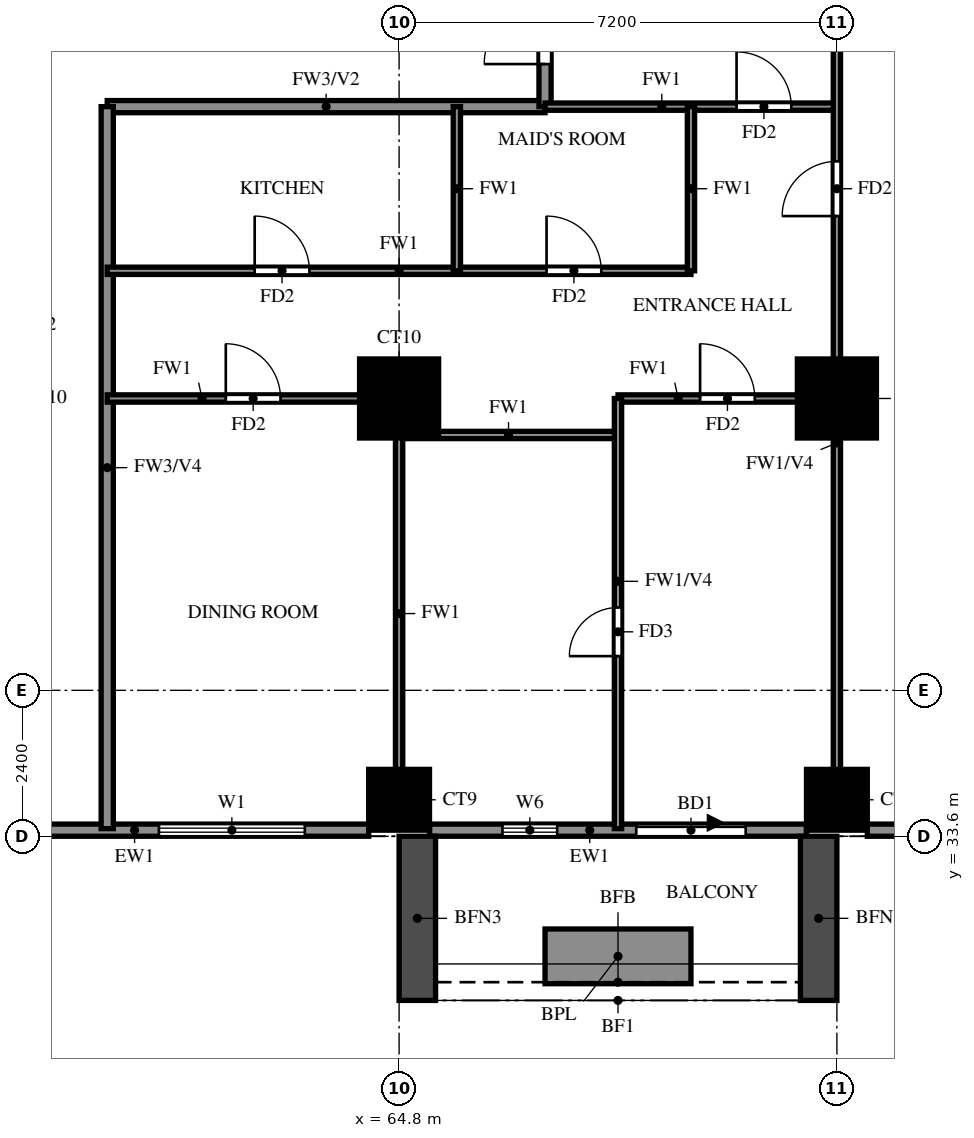
"""IFC4 building model, lengths in metres.
Left out: names, types, materials, properties, quantities, classifications, styles, units other than length and angle.
Written with IfcOpenShell. Run it as: python <this file> out.ifc"""

import sys

from ifc_helpers import new_model, si_unit, direction, frame, frame_2d, origin, origin_2d, place, context, subcontext, project, spatial, rectangle, extrude, source, transform, mapped, element, fill, save


model = new_model("IFC4")
c1 = context("Model", 3, precision=1e-05, world=origin(), true_north=direction((0.0, 1.0)))
c2 = subcontext(c1, "Body", "Model", "MODEL_VIEW")
j1 = project(units=[si_unit("LENGTHUNIT", "METRE"), si_unit("PLANEANGLEUNIT", "RADIAN")], contexts=[c1])
p1 = place(None, origin())
s1 = spatial("IfcSite", under=j1, at=p1, CompositionType="ELEMENT")
p2 = place(p1, origin())
s2 = spatial("IfcBuilding", under=s1, at=p2, CompositionType="ELEMENT")
p3 = place(p2, frame((0.0, 0.0, 72.5)))
s3 = spatial("IfcBuildingStorey", under=s2, at=p3, CompositionType="ELEMENT", Elevation=72.5)
m1 = source(origin(), c2, "Body", "SweptSolid", [
    extrude(rectangle(XDim=1.0, YDim=1.0, at=origin_2d()), origin(), (0.0, 0.0, 1.0), 3.18),
])
for number, where, z_axis, x_axis in (
    (1, (64.8, 34.2, 0.0), (0.0, 0.0, 1.0), (1.0, 0.0, 0.0)),
    (2, (72.0, 34.2, 0.0), (0.0, 0.0, 1.0), (1.0, 0.0, 0.0)),
):
    element("IfcColumn", number, at=place(p3, frame(where, z_axis=z_axis, x_axis=x_axis)), inside=s3, PredefinedType="COLUMN", context=c2, shape_type="MappedRepresentation", body=[
        mapped(m1, transform((0.0, 0.0, 0.0))),
    ])
m2 = source(origin(), c2, "Body", "SweptSolid", [
    extrude(rectangle(XDim=1.3, YDim=1.3, at=origin_2d()), origin(), (0.0, 0.0, 1.0), 3.18),
])
for number, where, z_axis, x_axis in (
    (3, (64.8, 40.8, 0.0), (0.0, 0.0, 1.0), (1.0, 0.0, 0.0)),
    (4, (72.0, 40.8, 0.0), (0.0, 0.0, 1.0), (1.0, 0.0, 0.0)),
):
    element("IfcColumn", number, at=place(p3, frame(where, z_axis=z_axis, x_axis=x_axis)), inside=s3, PredefinedType="COLUMN", context=c2, shape_type="MappedRepresentation", body=[
        mapped(m2, transform((0.0, 0.0, 0.0))),
    ])
p4 = place(p3, frame((85.996, 33.863, 0.0), z_axis=(0.0, 0.0, 1.0), x_axis=(-0.707100718496, 0.707112843825, 0.0)))
e5 = element("IfcWall", 5, at=p4, inside=s3, PredefinedType="SOLIDWALL", context=c2, shape_type="SweptSolid", body=[
    extrude(rectangle(XDim=20.135, YDim=0.2, at=frame_2d((10.067, 0.0))), origin(), (0.0, 0.0, 1.0), 3.18),
])
p5 = place(p3, frame((58.8, 33.7, 0.0), z_axis=(0.0, 0.0, 1.0), x_axis=(1.0, 0.0, 0.0)))
e6 = element("IfcWall", 6, at=p5, inside=s3, PredefinedType="SOLIDWALL", context=c2, shape_type="SweptSolid", body=[
    extrude(rectangle(XDim=5.5, YDim=0.2, at=frame_2d((2.75, 0.0))), origin(), (0.0, 0.0, 1.0), 3.18),
])
p6 = place(p5, frame((2.05, 0.0, 0.6)))
e7 = element("IfcOpeningElement", 7, at=p6, cuts=e6, PredefinedType="OPENING", context=c2, shape_type="SweptSolid", body=[
    extrude(rectangle(XDim=2.4, YDim=2.4, at=frame_2d((1.2, 1.2))), frame((0.0, 0.11, 0.0), z_axis=(0.0, -1.0, 0.0), x_axis=(1.0, 0.0, 0.0)), (0.0, 0.0, 1.0), 0.22),
])
p7 = place(p3, frame((65.3, 33.7, 0.0), z_axis=(0.0, 0.0, 1.0), x_axis=(1.0, 0.0, 0.0)))
e8 = element("IfcWall", 8, at=p7, inside=s3, PredefinedType="SOLIDWALL", context=c2, shape_type="SweptSolid", body=[
    extrude(rectangle(XDim=6.2, YDim=0.2, at=frame_2d((3.1, 0.0))), origin(), (0.0, 0.0, 1.0), 3.18),
])
p8 = place(p7, frame((3.4, 0.0, 0.0)))
e9 = element("IfcOpeningElement", 9, at=p8, cuts=e8, PredefinedType="OPENING", context=c2, shape_type="SweptSolid", body=[
    extrude(rectangle(XDim=1.8, YDim=2.4, at=frame_2d((0.9, 1.2))), frame((0.0, 0.11, 0.0), z_axis=(0.0, -1.0, 0.0), x_axis=(1.0, 0.0, 0.0)), (0.0, 0.0, 1.0), 0.22),
])
p9 = place(p7, frame((1.2, 0.0, 1.5)))
e10 = element("IfcOpeningElement", 10, at=p9, cuts=e8, PredefinedType="OPENING", context=c2, shape_type="SweptSolid", body=[
    extrude(rectangle(XDim=0.9, YDim=0.9, at=frame_2d((0.45, 0.45))), frame((0.0, 0.11, 0.0), z_axis=(0.0, -1.0, 0.0), x_axis=(1.0, 0.0, 0.0)), (0.0, 0.0, 1.0), 0.22),
])
p10 = place(p3, frame((72.5, 33.7, 0.0), z_axis=(0.0, 0.0, 1.0), x_axis=(1.0, 0.0, 0.0)))
e11 = element("IfcWall", 11, at=p10, inside=s3, PredefinedType="SOLIDWALL", context=c2, shape_type="SweptSolid", body=[
    extrude(rectangle(XDim=13.659, YDim=0.2, at=frame_2d((6.829, 0.0))), origin(), (0.0, 0.0, 1.0), 3.18),
])
p11 = place(p10, frame((1.2, 0.0, 0.6)))
e12 = element("IfcOpeningElement", 12, at=p11, cuts=e11, PredefinedType="OPENING", context=c2, shape_type="SweptSolid", body=[
    extrude(rectangle(XDim=2.4, YDim=2.4, at=frame_2d((1.2, 1.2))), frame((0.0, 0.11, 0.0), z_axis=(0.0, -1.0, 0.0), x_axis=(1.0, 0.0, 0.0)), (0.0, 0.0, 1.0), 0.22),
])
p12 = place(p10, frame((4.5, 0.0, 0.6)))
e13 = element("IfcOpeningElement", 13, at=p12, cuts=e11, PredefinedType="OPENING", context=c2, shape_type="SweptSolid", body=[
    extrude(rectangle(XDim=2.4, YDim=2.4, at=frame_2d((1.2, 1.2))), frame((0.0, 0.11, 0.0), z_axis=(0.0, -1.0, 0.0), x_axis=(1.0, 0.0, 0.0)), (0.0, 0.0, 1.0), 0.22),
])
p13 = place(p10, frame((9.479, 0.0, 0.6)))
e14 = element("IfcOpeningElement", 14, at=p13, cuts=e11, PredefinedType="OPENING", context=c2, shape_type="SweptSolid", body=[
    extrude(rectangle(XDim=2.4, YDim=2.4, at=frame_2d((1.2, 1.2))), frame((0.0, 0.11, 0.0), z_axis=(0.0, -1.0, 0.0), x_axis=(1.0, 0.0, 0.0)), (0.0, 0.0, 1.0), 0.22),
])
for number, where, z_axis, x_axis in (
    (15, (65.1, 33.6, 0.0), (0.0, 0.0, 1.0), (0.0, -1.0, 0.0)),
    (16, (71.7, 33.6, 0.0), (0.0, 0.0, 1.0), (0.0, -1.0, 0.0)),
):
    element("IfcWall", number, at=place(p3, frame(where, z_axis=z_axis, x_axis=x_axis)), inside=s3, PredefinedType="SOLIDWALL", context=c2, shape_type="SweptSolid", body=[
        extrude(rectangle(XDim=2.7, YDim=0.6, at=frame_2d((1.35, 0.0))), origin(), (0.0, 0.0, 1.0), 2.85),
    ])
p14 = place(p3, frame((67.2, 31.625, 0.0), z_axis=(0.0, 0.0, 1.0), x_axis=(1.0, 0.0, 0.0)))
e17 = element("IfcWall", 17, at=p14, inside=s3, PredefinedType="SOLIDWALL", context=c2, shape_type="SweptSolid", body=[
    extrude(rectangle(XDim=2.4, YDim=0.9, at=frame_2d((1.2, 0.0))), origin(), (0.0, 0.0, 1.0), 0.9),
])
p15 = place(p3, frame((60.0, 45.6, 0.0), z_axis=(0.0, 0.0, 1.0), x_axis=(1.0, 0.0, 0.0)))
e18 = element("IfcWall", 18, at=p15, inside=s3, PredefinedType="SOLIDWALL", context=c2, shape_type="SweptSolid", body=[
    extrude(rectangle(XDim=7.2, YDim=0.2, at=frame_2d((3.6, 0.0))), origin(), (0.0, 0.0, 1.0), 3.18),
])
p16 = place(p3, frame((60.0, 33.725, 0.0), z_axis=(0.0, 0.0, 1.0), x_axis=(0.0, 1.0, 0.0)))
e19 = element("IfcWall", 19, at=p16, inside=s3, PredefinedType="SOLIDWALL", context=c2, shape_type="SweptSolid", body=[
    extrude(rectangle(XDim=11.875, YDim=0.2, at=frame_2d((5.938, 0.0))), origin(), (0.0, 0.0, 1.0), 2.28),
])
p17 = place(p3, frame((67.2, 45.6, 0.0), z_axis=(0.0, 0.0, 1.0), x_axis=(0.0, 1.0, 0.0)))
e20 = element("IfcWall", 20, at=p17, inside=s3, PredefinedType="SOLIDWALL", context=c2, shape_type="SweptSolid", body=[
    extrude(rectangle(XDim=14.4, YDim=0.2, at=frame_2d((7.2, 0.0))), origin(), (0.0, 0.0, 1.0), 3.18),
])
p18 = place(p17, frame((0.7, 0.0, 0.0)))
e21 = element("IfcOpeningElement", 21, at=p18, cuts=e20, PredefinedType="OPENING", context=c2, shape_type="SweptSolid", body=[
    extrude(rectangle(XDim=1.0, YDim=2.1, at=frame_2d((0.5, 1.05))), frame((0.0, 0.11, 0.0), z_axis=(0.0, -1.0, 0.0), x_axis=(1.0, 0.0, 0.0)), (0.0, 0.0, 1.0), 0.22),
])
p19 = place(p3, frame((64.8, 40.2, 0.0), z_axis=(0.0, 0.0, 1.0), x_axis=(1.0, 0.0, 0.0)))
e22 = element("IfcWall", 22, at=p19, inside=s3, PredefinedType="PARTITIONING", context=c2, shape_type="SweptSolid", body=[
    extrude(rectangle(XDim=3.6, YDim=0.12, at=frame_2d((1.8, 0.0))), origin(), (0.0, 0.0, 1.0), 3.18),
])
p20 = place(p3, frame((60.0, 40.8, 0.0), z_axis=(0.0, 0.0, 1.0), x_axis=(1.0, 0.0, 0.0)))
e23 = element("IfcWall", 23, at=p20, inside=s3, PredefinedType="PARTITIONING", context=c2, shape_type="SweptSolid", body=[
    extrude(rectangle(XDim=4.8, YDim=0.12, at=frame_2d((2.4, 0.0))), origin(), (0.0, 0.0, 1.0), 3.18),
])
p21 = place(p20, frame((1.95, 0.0, 0.0)))
e24 = element("IfcOpeningElement", 24, at=p21, cuts=e23, PredefinedType="OPENING", context=c2, shape_type="SweptSolid", body=[
    extrude(rectangle(XDim=0.9, YDim=2.1, at=frame_2d((0.45, 1.05))), frame((0.0, 0.07, 0.0), z_axis=(0.0, -1.0, 0.0), x_axis=(1.0, 0.0, 0.0)), (0.0, 0.0, 1.0), 0.14),
])
p22 = place(p3, frame((68.4, 40.8, 0.0), z_axis=(0.0, 0.0, 1.0), x_axis=(1.0, 0.0, 0.0)))
e25 = element("IfcWall", 25, at=p22, inside=s3, PredefinedType="PARTITIONING", context=c2, shape_type="SweptSolid", body=[
    extrude(rectangle(XDim=3.6, YDim=0.12, at=frame_2d((1.8, 0.0))), origin(), (0.0, 0.0, 1.0), 3.18),
])
p23 = place(p22, frame((1.35, 0.0, 0.0)))
e26 = element("IfcOpeningElement", 26, at=p23, cuts=e25, PredefinedType="OPENING", context=c2, shape_type="SweptSolid", body=[
    extrude(rectangle(XDim=0.9, YDim=2.1, at=frame_2d((0.45, 1.05))), frame((0.0, 0.07, 0.0), z_axis=(0.0, -1.0, 0.0), x_axis=(1.0, 0.0, 0.0)), (0.0, 0.0, 1.0), 0.14),
])
p24 = place(p3, frame((60.0, 42.9, 0.0), z_axis=(0.0, 0.0, 1.0), x_axis=(1.0, 0.0, 0.0)))
e27 = element("IfcWall", 27, at=p24, inside=s3, PredefinedType="PARTITIONING", context=c2, shape_type="SweptSolid", body=[
    extrude(rectangle(XDim=9.6, YDim=0.12, at=frame_2d((4.8, 0.0))), origin(), (0.0, 0.0, 1.0), 3.18),
])
p25 = place(p24, frame((7.225, 0.0, 0.0)))
e28 = element("IfcOpeningElement", 28, at=p25, cuts=e27, PredefinedType="OPENING", context=c2, shape_type="SweptSolid", body=[
    extrude(rectangle(XDim=0.9, YDim=2.1, at=frame_2d((0.45, 1.05))), frame((0.0, 0.07, 0.0), z_axis=(0.0, -1.0, 0.0), x_axis=(1.0, 0.0, 0.0)), (0.0, 0.0, 1.0), 0.14),
])
p26 = place(p24, frame((2.425, 0.0, 0.0)))
e29 = element("IfcOpeningElement", 29, at=p26, cuts=e27, PredefinedType="OPENING", context=c2, shape_type="SweptSolid", body=[
    extrude(rectangle(XDim=0.9, YDim=2.1, at=frame_2d((0.45, 1.05))), frame((0.0, 0.07, 0.0), z_axis=(0.0, -1.0, 0.0), x_axis=(1.0, 0.0, 0.0)), (0.0, 0.0, 1.0), 0.14),
])
p27 = place(p3, frame((67.2, 45.6, 0.0), z_axis=(0.0, 0.0, 1.0), x_axis=(1.0, 0.0, 0.0)))
e30 = element("IfcWall", 30, at=p27, inside=s3, PredefinedType="PARTITIONING", context=c2, shape_type="SweptSolid", body=[
    extrude(rectangle(XDim=4.8, YDim=0.12, at=frame_2d((2.4, 0.0))), origin(), (0.0, 0.0, 1.0), 3.18),
])
p28 = place(p27, frame((3.15, 0.0, 0.0)))
e31 = element("IfcOpeningElement", 31, at=p28, cuts=e30, PredefinedType="OPENING", context=c2, shape_type="SweptSolid", body=[
    extrude(rectangle(XDim=0.9, YDim=2.1, at=frame_2d((0.45, 1.05))), frame((0.0, 0.07, 0.0), z_axis=(0.0, -1.0, 0.0), x_axis=(1.0, 0.0, 0.0)), (0.0, 0.0, 1.0), 0.14),
])
p29 = place(p3, frame((64.8, 33.725, 0.0), z_axis=(0.0, 0.0, 1.0), x_axis=(0.0, 1.0, 0.0)))
e32 = element("IfcWall", 32, at=p29, inside=s3, PredefinedType="PARTITIONING", context=c2, shape_type="SweptSolid", body=[
    extrude(rectangle(XDim=7.075, YDim=0.12, at=frame_2d((3.538, 0.0))), origin(), (0.0, 0.0, 1.0), 3.18),
])
p30 = place(p3, frame((65.75, 42.9, 0.0), z_axis=(0.0, 0.0, 1.0), x_axis=(0.0, 1.0, 0.0)))
e33 = element("IfcWall", 33, at=p30, inside=s3, PredefinedType="PARTITIONING", context=c2, shape_type="SweptSolid", body=[
    extrude(rectangle(XDim=2.7, YDim=0.12, at=frame_2d((1.35, 0.0))), origin(), (0.0, 0.0, 1.0), 3.18),
])
p31 = place(p3, frame((68.4, 33.725, 0.0), z_axis=(0.0, 0.0, 1.0), x_axis=(0.0, 1.0, 0.0)))
e34 = element("IfcWall", 34, at=p31, inside=s3, PredefinedType="PARTITIONING", context=c2, shape_type="SweptSolid", body=[
    extrude(rectangle(XDim=7.075, YDim=0.12, at=frame_2d((3.538, 0.0))), origin(), (0.0, 0.0, 1.0), 2.28),
])
p32 = place(p31, frame((2.837, 0.0, 0.0)))
e35 = element("IfcOpeningElement", 35, at=p32, cuts=e34, PredefinedType="OPENING", context=c2, shape_type="SweptSolid", body=[
    extrude(rectangle(XDim=0.8, YDim=2.1, at=frame_2d((0.4, 1.05))), frame((0.0, 0.07, 0.0), z_axis=(0.0, -1.0, 0.0), x_axis=(1.0, 0.0, 0.0)), (0.0, 0.0, 1.0), 0.14),
])
p33 = place(p3, frame((69.6, 42.9, 0.0), z_axis=(0.0, 0.0, 1.0), x_axis=(0.0, 1.0, 0.0)))
e36 = element("IfcWall", 36, at=p33, inside=s3, PredefinedType="PARTITIONING", context=c2, shape_type="SweptSolid", body=[
    extrude(rectangle(XDim=2.7, YDim=0.12, at=frame_2d((1.35, 0.0))), origin(), (0.0, 0.0, 1.0), 3.18),
])
p34 = place(p3, frame((72.0, 33.725, 0.0), z_axis=(0.0, 0.0, 1.0), x_axis=(0.0, 1.0, 0.0)))
e37 = element("IfcWall", 37, at=p34, inside=s3, PredefinedType="PARTITIONING", context=c2, shape_type="SweptSolid", body=[
    extrude(rectangle(XDim=14.098, YDim=0.12, at=frame_2d((7.049, 0.0))), origin(), (0.0, 0.0, 1.0), 2.28),
])
p35 = place(p34, frame((10.075, 0.0, 0.0)))
e38 = element("IfcOpeningElement", 38, at=p35, cuts=e37, PredefinedType="OPENING", context=c2, shape_type="SweptSolid", body=[
    extrude(rectangle(XDim=0.9, YDim=2.1, at=frame_2d((0.45, 1.05))), frame((0.0, 0.07, 0.0), z_axis=(0.0, -1.0, 0.0), x_axis=(1.0, 0.0, 0.0)), (0.0, 0.0, 1.0), 0.14),
])
p36 = place(p6, origin())
e39 = element("IfcWindow", 39, at=p36, inside=s3, PartitioningType="DOUBLE_PANEL_VERTICAL", PredefinedType="WINDOW", context=c2, shape_type="SweptSolid", body=[
    extrude(rectangle(XDim=2.4, YDim=2.4, at=frame_2d((1.2, 1.2))), frame((0.0, 0.03, 0.0), z_axis=(0.0, -1.0, 0.0), x_axis=(1.0, 0.0, 0.0)), (0.0, 0.0, 1.0), 0.06),
])
fill(e7, e39)
p37 = place(p8, origin())
e40 = element("IfcDoor", 40, at=p37, inside=s3, OperationType="DOUBLE_DOOR_SLIDING", PredefinedType="DOOR", context=c2, shape_type="SweptSolid", body=[
    extrude(rectangle(XDim=1.8, YDim=2.4, at=frame_2d((0.9, 1.2))), frame((0.0, 0.025, 0.0), z_axis=(0.0, -1.0, 0.0), x_axis=(1.0, 0.0, 0.0)), (0.0, 0.0, 1.0), 0.05),
])
fill(e9, e40)
p38 = place(p9, origin())
e41 = element("IfcWindow", 41, at=p38, inside=s3, PartitioningType="SINGLE_PANEL", PredefinedType="WINDOW", context=c2, shape_type="SweptSolid", body=[
    extrude(rectangle(XDim=0.9, YDim=0.9, at=frame_2d((0.45, 0.45))), frame((0.0, 0.03, 0.0), z_axis=(0.0, -1.0, 0.0), x_axis=(1.0, 0.0, 0.0)), (0.0, 0.0, 1.0), 0.06),
])
fill(e10, e41)
p39 = place(p28, origin())
e42 = element("IfcDoor", 42, at=p39, inside=s3, OperationType="SINGLE_SWING_RIGHT", PredefinedType="DOOR", context=c2, shape_type="SweptSolid", body=[
    extrude(rectangle(XDim=0.9, YDim=2.1, at=frame_2d((0.45, 1.05))), frame((0.0, 0.025, 0.0), z_axis=(0.0, -1.0, 0.0), x_axis=(1.0, 0.0, 0.0)), (0.0, 0.0, 1.0), 0.05),
])
fill(e31, e42)
p40 = place(p18, origin())
e43 = element("IfcDoor", 43, at=p40, inside=s3, OperationType="SINGLE_SWING_LEFT", PredefinedType="DOOR", context=c2, shape_type="SweptSolid", body=[
    extrude(rectangle(XDim=1.0, YDim=2.1, at=frame_2d((0.5, 1.05))), frame((0.0, 0.025, 0.0), z_axis=(0.0, -1.0, 0.0), x_axis=(1.0, 0.0, 0.0)), (0.0, 0.0, 1.0), 0.05),
])
fill(e21, e43)
p41 = place(p23, origin())
e44 = element("IfcDoor", 44, at=p41, inside=s3, OperationType="SINGLE_SWING_LEFT", PredefinedType="DOOR", context=c2, shape_type="SweptSolid", body=[
    extrude(rectangle(XDim=0.9, YDim=2.1, at=frame_2d((0.45, 1.05))), frame((0.0, 0.025, 0.0), z_axis=(0.0, -1.0, 0.0), x_axis=(1.0, 0.0, 0.0)), (0.0, 0.0, 1.0), 0.05),
])
fill(e26, e44)
p42 = place(p32, origin())
e45 = element("IfcDoor", 45, at=p42, inside=s3, OperationType="SINGLE_SWING_RIGHT", PredefinedType="DOOR", context=c2, shape_type="SweptSolid", body=[
    extrude(rectangle(XDim=0.8, YDim=2.1, at=frame_2d((0.4, 1.05))), frame((0.0, 0.025, 0.0), z_axis=(0.0, -1.0, 0.0), x_axis=(1.0, 0.0, 0.0)), (0.0, 0.0, 1.0), 0.05),
])
fill(e35, e45)
p43 = place(p21, origin())
e46 = element("IfcDoor", 46, at=p43, inside=s3, OperationType="SINGLE_SWING_LEFT", PredefinedType="DOOR", context=c2, shape_type="SweptSolid", body=[
    extrude(rectangle(XDim=0.9, YDim=2.1, at=frame_2d((0.45, 1.05))), frame((0.0, 0.025, 0.0), z_axis=(0.0, -1.0, 0.0), x_axis=(1.0, 0.0, 0.0)), (0.0, 0.0, 1.0), 0.05),
])
fill(e24, e46)
p44 = place(p25, origin())
e47 = element("IfcDoor", 47, at=p44, inside=s3, OperationType="SINGLE_SWING_LEFT", PredefinedType="DOOR", context=c2, shape_type="SweptSolid", body=[
    extrude(rectangle(XDim=0.9, YDim=2.1, at=frame_2d((0.45, 1.05))), frame((0.0, 0.025, 0.0), z_axis=(0.0, -1.0, 0.0), x_axis=(1.0, 0.0, 0.0)), (0.0, 0.0, 1.0), 0.05),
])
fill(e28, e47)
p45 = place(p26, origin())
e48 = element("IfcDoor", 48, at=p45, inside=s3, OperationType="SINGLE_SWING_RIGHT", PredefinedType="DOOR", context=c2, shape_type="SweptSolid", body=[
    extrude(rectangle(XDim=0.9, YDim=2.1, at=frame_2d((0.45, 1.05))), frame((0.0, 0.025, 0.0), z_axis=(0.0, -1.0, 0.0), x_axis=(1.0, 0.0, 0.0)), (0.0, 0.0, 1.0), 0.05),
])
fill(e29, e48)
p46 = place(p35, origin())
e49 = element("IfcDoor", 49, at=p46, inside=s3, OperationType="SINGLE_SWING_LEFT", PredefinedType="DOOR", context=c2, shape_type="SweptSolid", body=[
    extrude(rectangle(XDim=0.9, YDim=2.1, at=frame_2d((0.45, 1.05))), frame((0.0, 0.025, 0.0), z_axis=(0.0, -1.0, 0.0), x_axis=(1.0, 0.0, 0.0)), (0.0, 0.0, 1.0), 0.05),
])
fill(e38, e49)
save(model, sys.argv[1])
